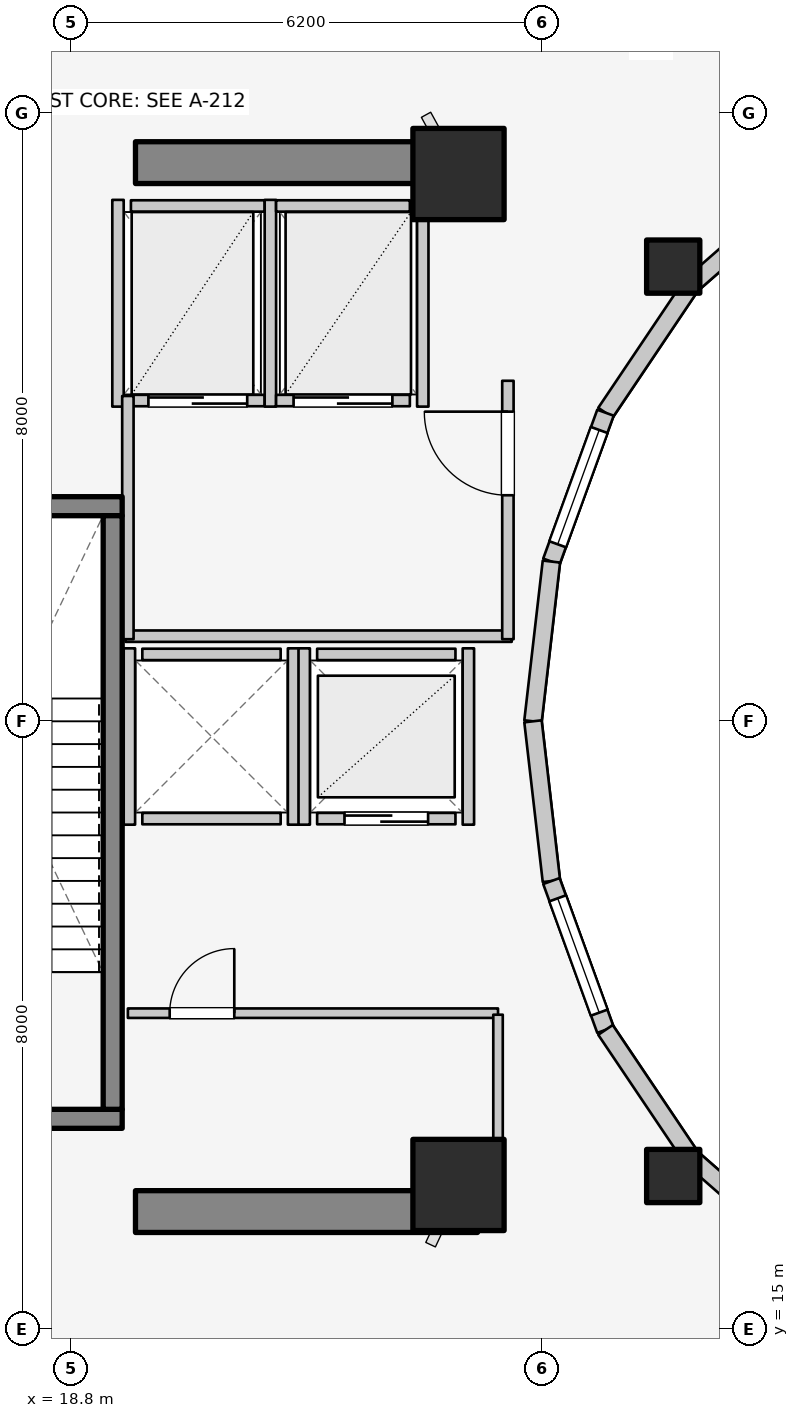
"""IFC4 building model, lengths in metres.
Left out: names, types, materials, properties, quantities, classifications, styles, units other than length and angle.
Written with IfcOpenShell. Run it as: python <this file> out.ifc"""

import sys

from ifc_helpers import new_model, si_unit, direction, frame, frame_2d, origin, origin_2d, place, context, subcontext, project, spatial, rectangle, extrude, element, fill, save


model = new_model("IFC4")
c1 = context("Model", 3, precision=1e-05, world=origin(), true_north=direction((0.0, 1.0)))
c2 = subcontext(c1, "Body", "Model", "MODEL_VIEW")
j1 = project(units=[si_unit("LENGTHUNIT", "METRE"), si_unit("PLANEANGLEUNIT", "RADIAN")], contexts=[c1])
p1 = place(None, origin())
s1 = spatial("IfcSite", under=j1, at=p1, CompositionType="ELEMENT")
p2 = place(p1, origin())
s2 = spatial("IfcBuilding", under=s1, at=p2, CompositionType="ELEMENT")
p3 = place(p2, frame((0.0, 0.0, 193.2)))
s3 = spatial("IfcBuildingStorey", under=s2, at=p3, CompositionType="ELEMENT", Elevation=193.2)
for number, where, z_axis, x_axis in (
    (1, (19.65, 16.55, 0.0), (0.0, 0.0, 1.0), (1.0, 0.0, 0.0)),
    (2, (19.65, 30.35, 0.0), (0.0, 0.0, 1.0), (1.0, 0.0, 0.0)),
):
    element("IfcWall", number, at=place(p3, frame(where, z_axis=z_axis, x_axis=x_axis)), inside=s3, PredefinedType="SHEAR", context=c2, shape_type="SweptSolid", body=[
        extrude(rectangle(XDim=4.5, YDim=0.55, at=frame_2d((2.25, 0.0))), origin(), (0.0, 0.0, 1.0), 4.2),
    ])
p4 = place(p3, frame((16.105, 17.77, 0.0), z_axis=(0.0, 0.0, 1.0), x_axis=(1.0, 0.0, 0.0)))
e3 = element("IfcWall", 3, at=p4, inside=s3, PredefinedType="SOLIDWALL", context=c2, shape_type="SweptSolid", body=[
    extrude(rectangle(XDim=3.37, YDim=0.25, at=frame_2d((1.685, 0.0))), origin(), (0.0, 0.0, 1.0), 4.2),
])
p5 = place(p4, frame((1.135, 0.0, 0.0)))
e4 = element("IfcOpeningElement", 4, at=p5, cuts=e3, PredefinedType="OPENING", context=c2, shape_type="SweptSolid", body=[
    extrude(rectangle(XDim=1.1, YDim=2.1, at=frame_2d((0.55, 1.05))), frame((0.0, 0.135, 0.0), z_axis=(0.0, -1.0, 0.0), x_axis=(1.0, 0.0, 0.0)), (0.0, 0.0, 1.0), 0.27),
])
p6 = place(p3, frame((16.105, 25.83, 0.0), z_axis=(0.0, 0.0, 1.0), x_axis=(1.0, 0.0, 0.0)))
e5 = element("IfcWall", 5, at=p6, inside=s3, PredefinedType="SOLIDWALL", context=c2, shape_type="SweptSolid", body=[
    extrude(rectangle(XDim=3.37, YDim=0.25, at=frame_2d((1.685, 0.0))), origin(), (0.0, 0.0, 1.0), 4.2),
])
p7 = place(p3, frame((19.35, 17.895, 0.0), z_axis=(0.0, 0.0, 1.0), x_axis=(0.0, 1.0, 0.0)))
e6 = element("IfcWall", 6, at=p7, inside=s3, PredefinedType="SOLIDWALL", context=c2, shape_type="SweptSolid", body=[
    extrude(rectangle(XDim=7.81, YDim=0.25, at=frame_2d((3.905, 0.0))), origin(), (0.0, 0.0, 1.0), 4.2),
])
for number, where, z_axis, x_axis in (
    (7, (23.9, 16.9, 0.0), (0.0, 0.0, 1.0), (1.0, 0.0, 0.0)),
    (8, (23.9, 30.2, 0.0), (0.0, 0.0, 1.0), (1.0, 0.0, 0.0)),
):
    element("IfcColumn", number, at=place(p3, frame(where, z_axis=z_axis, x_axis=x_axis)), inside=s3, PredefinedType="COLUMN", context=c2, shape_type="SweptSolid", body=[
        extrude(rectangle(XDim=1.2, YDim=1.2, at=origin_2d()), origin(), (0.0, 0.0, 1.0), 4.2),
    ])
for number, where, z_axis, x_axis in (
    (9, (26.725, 28.982, 0.0), (0.0, 0.0, 1.0), (1.0, 0.0, 0.0)),
    (10, (26.725, 17.018, 0.0), (0.0, 0.0, 1.0), (1.0, 0.0, 0.0)),
):
    element("IfcColumn", number, at=place(p3, frame(where, z_axis=z_axis, x_axis=x_axis)), inside=s3, PredefinedType="COLUMN", context=c2, shape_type="SweptSolid", body=[
        extrude(rectangle(XDim=0.7, YDim=0.7, at=origin_2d()), origin(), (0.0, 0.0, 1.0), 4.2),
    ])
p8 = place(p3, frame((28.44, 30.032, 0.0), z_axis=(0.0, 0.0, 1.0), x_axis=(-0.752576694707, -0.658504607869, 0.0)))
e11 = element("IfcWall", 11, at=p8, inside=s3, PredefinedType="STANDARD", context=c2, shape_type="SweptSolid", body=[
    extrude(rectangle(XDim=1.959, YDim=0.23, at=frame_2d((0.98, 0.0))), origin(), (0.0, 0.0, 1.0), 2.32),
])
p9 = place(p3, frame((26.965, 28.742, 0.0), z_axis=(0.0, 0.0, 1.0), x_axis=(-0.558197800898, -0.829707909492, 0.0)))
e12 = element("IfcWall", 12, at=p9, inside=s3, PredefinedType="STANDARD", context=c2, shape_type="SweptSolid", body=[
    extrude(rectangle(XDim=2.027, YDim=0.23, at=frame_2d((1.013, 0.0))), origin(), (0.0, 0.0, 1.0), 2.32),
])
p10 = place(p3, frame((25.834, 27.06, 0.0), z_axis=(0.0, 0.0, 1.0), x_axis=(-0.341423187295, -0.93990968033, 0.0)))
e13 = element("IfcWall", 13, at=p10, inside=s3, PredefinedType="STANDARD", context=c2, shape_type="SweptSolid", body=[
    extrude(rectangle(XDim=2.084, YDim=0.23, at=frame_2d((1.042, 0.0))), origin(), (0.0, 0.0, 1.0), 2.8),
])
p11 = place(p10, frame((0.242, 0.0, 0.85)))
e14 = element("IfcOpeningElement", 14, at=p11, cuts=e13, PredefinedType="OPENING", context=c2, shape_type="SweptSolid", body=[
    extrude(rectangle(XDim=1.6, YDim=1.65, at=frame_2d((0.8, 0.825))), frame((0.0, 0.125, 0.0), z_axis=(0.0, -1.0, 0.0), x_axis=(1.0, 0.0, 0.0)), (0.0, 0.0, 1.0), 0.25),
])
for number, where, z_axis, x_axis in (
    (15, (25.123, 25.102, 0.0), (0.0, 0.0, 1.0), (-0.115, -0.993, 0.0)),
    (16, (24.88, 23.0, 0.0), (0.0, 0.0, 1.0), (0.115, -0.993, 0.0)),
):
    element("IfcWall", number, at=place(p3, frame(where, z_axis=z_axis, x_axis=x_axis)), inside=s3, PredefinedType="STANDARD", context=c2, shape_type="SweptSolid", body=[
        extrude(rectangle(XDim=2.115, YDim=0.23, at=frame_2d((1.058, 0.0))), origin(), (0.0, 0.0, 1.0), 2.8),
    ])
p12 = place(p3, frame((25.123, 20.898, 0.0), z_axis=(0.0, 0.0, 1.0), x_axis=(0.341423187295, -0.93990968033, 0.0)))
e17 = element("IfcWall", 17, at=p12, inside=s3, PredefinedType="STANDARD", context=c2, shape_type="SweptSolid", body=[
    extrude(rectangle(XDim=2.084, YDim=0.23, at=frame_2d((1.042, 0.0))), origin(), (0.0, 0.0, 1.0), 2.8),
])
p13 = place(p12, frame((0.242, 0.0, 0.85)))
e18 = element("IfcOpeningElement", 18, at=p13, cuts=e17, PredefinedType="OPENING", context=c2, shape_type="SweptSolid", body=[
    extrude(rectangle(XDim=1.6, YDim=1.65, at=frame_2d((0.8, 0.825))), frame((0.0, 0.125, 0.0), z_axis=(0.0, -1.0, 0.0), x_axis=(1.0, 0.0, 0.0)), (0.0, 0.0, 1.0), 0.25),
])
p14 = place(p3, frame((25.834, 18.94, 0.0), z_axis=(0.0, 0.0, 1.0), x_axis=(0.558197800898, -0.829707909492, 0.0)))
e19 = element("IfcWall", 19, at=p14, inside=s3, PredefinedType="STANDARD", context=c2, shape_type="SweptSolid", body=[
    extrude(rectangle(XDim=2.027, YDim=0.23, at=frame_2d((1.013, 0.0))), origin(), (0.0, 0.0, 1.0), 2.32),
])
p15 = place(p3, frame((26.965, 17.258, 0.0), z_axis=(0.0, 0.0, 1.0), x_axis=(0.752576694707, -0.658504607869, 0.0)))
e20 = element("IfcWall", 20, at=p15, inside=s3, PredefinedType="STANDARD", context=c2, shape_type="SweptSolid", body=[
    extrude(rectangle(XDim=1.959, YDim=0.23, at=frame_2d((0.98, 0.0))), origin(), (0.0, 0.0, 1.0), 2.32),
])
for number, where, z_axis, x_axis in (
    (21, (19.74, 21.72, 0.0), (0.0, 0.0, 1.0), (1.0, 0.0, 0.0)),
    (22, (19.74, 23.88, 0.0), (0.0, 0.0, 1.0), (1.0, 0.0, 0.0)),
):
    element("IfcWall", number, at=place(p3, frame(where, z_axis=z_axis, x_axis=x_axis)), inside=s3, PredefinedType="SOLIDWALL", context=c2, shape_type="SweptSolid", body=[
        extrude(rectangle(XDim=1.82, YDim=0.15, at=frame_2d((0.91, 0.0))), origin(), (0.0, 0.0, 1.0), 3.675),
    ])
for number, where, z_axis, x_axis in (
    (23, (19.57, 21.64, 0.0), (0.0, 0.0, 1.0), (0.0, 1.0, 0.0)),
    (24, (21.73, 21.64, 0.0), (0.0, 0.0, 1.0), (0.0, 1.0, 0.0)),
):
    element("IfcWall", number, at=place(p3, frame(where, z_axis=z_axis, x_axis=x_axis)), inside=s3, PredefinedType="SOLIDWALL", context=c2, shape_type="SweptSolid", body=[
        extrude(rectangle(XDim=2.32, YDim=0.15, at=frame_2d((1.16, 0.0))), origin(), (0.0, 0.0, 1.0), 3.675),
    ])
p16 = place(p3, frame((22.04, 21.72, 0.0), z_axis=(0.0, 0.0, 1.0), x_axis=(1.0, 0.0, 0.0)))
e25 = element("IfcWall", 25, at=p16, inside=s3, PredefinedType="SOLIDWALL", context=c2, shape_type="SweptSolid", body=[
    extrude(rectangle(XDim=1.82, YDim=0.15, at=frame_2d((0.91, 0.0))), origin(), (0.0, 0.0, 1.0), 3.22),
])
p17 = place(p16, frame((0.36, 0.0, 0.0)))
e26 = element("IfcOpeningElement", 26, at=p17, cuts=e25, PredefinedType="OPENING", context=c2, shape_type="SweptSolid", body=[
    extrude(rectangle(XDim=1.1, YDim=2.1, at=frame_2d((0.55, 1.05))), frame((0.0, 0.085, 0.0), z_axis=(0.0, -1.0, 0.0), x_axis=(1.0, 0.0, 0.0)), (0.0, 0.0, 1.0), 0.17),
])
p18 = place(p3, frame((22.04, 23.88, 0.0), z_axis=(0.0, 0.0, 1.0), x_axis=(1.0, 0.0, 0.0)))
e27 = element("IfcWall", 27, at=p18, inside=s3, PredefinedType="SOLIDWALL", context=c2, shape_type="SweptSolid", body=[
    extrude(rectangle(XDim=1.82, YDim=0.15, at=frame_2d((0.91, 0.0))), origin(), (0.0, 0.0, 1.0), 3.22),
])
p19 = place(p3, frame((21.87, 21.64, 0.0), z_axis=(0.0, 0.0, 1.0), x_axis=(0.0, 1.0, 0.0)))
e28 = element("IfcWall", 28, at=p19, inside=s3, PredefinedType="SOLIDWALL", context=c2, shape_type="SweptSolid", body=[
    extrude(rectangle(XDim=2.32, YDim=0.15, at=frame_2d((1.16, 0.0))), origin(), (0.0, 0.0, 1.0), 3.675),
])
p20 = place(p3, frame((24.03, 21.64, 0.0), z_axis=(0.0, 0.0, 1.0), x_axis=(0.0, 1.0, 0.0)))
e29 = element("IfcWall", 29, at=p20, inside=s3, PredefinedType="SOLIDWALL", context=c2, shape_type="SweptSolid", body=[
    extrude(rectangle(XDim=2.32, YDim=0.15, at=frame_2d((1.16, 0.0))), origin(), (0.0, 0.0, 1.0), 3.22),
])
p21 = place(p3, frame((19.59, 27.22, 0.0), z_axis=(0.0, 0.0, 1.0), x_axis=(1.0, 0.0, 0.0)))
e30 = element("IfcWall", 30, at=p21, inside=s3, PredefinedType="SOLIDWALL", context=c2, shape_type="SweptSolid", body=[
    extrude(rectangle(XDim=1.76, YDim=0.15, at=frame_2d((0.88, 0.0))), origin(), (0.0, 0.0, 1.0), 3.675),
])
p22 = place(p21, frame((0.23, 0.0, 0.0)))
e31 = element("IfcOpeningElement", 31, at=p22, cuts=e30, PredefinedType="OPENING", context=c2, shape_type="SweptSolid", body=[
    extrude(rectangle(XDim=1.3, YDim=2.1, at=frame_2d((0.65, 1.05))), frame((0.0, 0.085, 0.0), z_axis=(0.0, -1.0, 0.0), x_axis=(1.0, 0.0, 0.0)), (0.0, 0.0, 1.0), 0.17),
])
p23 = place(p3, frame((19.59, 29.78, 0.0), z_axis=(0.0, 0.0, 1.0), x_axis=(1.0, 0.0, 0.0)))
e32 = element("IfcWall", 32, at=p23, inside=s3, PredefinedType="SOLIDWALL", context=c2, shape_type="SweptSolid", body=[
    extrude(rectangle(XDim=1.76, YDim=0.15, at=frame_2d((0.88, 0.0))), origin(), (0.0, 0.0, 1.0), 3.675),
])
for number, where, z_axis, x_axis in (
    (33, (19.42, 27.14, 0.0), (0.0, 0.0, 1.0), (0.0, 1.0, 0.0)),
    (34, (21.425, 27.14, 0.0), (0.0, 0.0, 1.0), (0.0, 1.0, 0.0)),
):
    element("IfcWall", number, at=place(p3, frame(where, z_axis=z_axis, x_axis=x_axis)), inside=s3, PredefinedType="SOLIDWALL", context=c2, shape_type="SweptSolid", body=[
        extrude(rectangle(XDim=2.72, YDim=0.15, at=frame_2d((1.36, 0.0))), origin(), (0.0, 0.0, 1.0), 3.675),
    ])
p24 = place(p3, frame((21.5, 27.22, 0.0), z_axis=(0.0, 0.0, 1.0), x_axis=(1.0, 0.0, 0.0)))
e35 = element("IfcWall", 35, at=p24, inside=s3, PredefinedType="SOLIDWALL", context=c2, shape_type="SweptSolid", body=[
    extrude(rectangle(XDim=1.76, YDim=0.15, at=frame_2d((0.88, 0.0))), origin(), (0.0, 0.0, 1.0), 3.675),
])
p25 = place(p24, frame((0.23, 0.0, 0.0)))
e36 = element("IfcOpeningElement", 36, at=p25, cuts=e35, PredefinedType="OPENING", context=c2, shape_type="SweptSolid", body=[
    extrude(rectangle(XDim=1.3, YDim=2.1, at=frame_2d((0.65, 1.05))), frame((0.0, 0.085, 0.0), z_axis=(0.0, -1.0, 0.0), x_axis=(1.0, 0.0, 0.0)), (0.0, 0.0, 1.0), 0.17),
])
p26 = place(p3, frame((21.5, 29.78, 0.0), z_axis=(0.0, 0.0, 1.0), x_axis=(1.0, 0.0, 0.0)))
e37 = element("IfcWall", 37, at=p26, inside=s3, PredefinedType="SOLIDWALL", context=c2, shape_type="SweptSolid", body=[
    extrude(rectangle(XDim=1.76, YDim=0.15, at=frame_2d((0.88, 0.0))), origin(), (0.0, 0.0, 1.0), 3.675),
])
p27 = place(p3, frame((23.43, 27.14, 0.0), z_axis=(0.0, 0.0, 1.0), x_axis=(0.0, 1.0, 0.0)))
e38 = element("IfcWall", 38, at=p27, inside=s3, PredefinedType="SOLIDWALL", context=c2, shape_type="SweptSolid", body=[
    extrude(rectangle(XDim=2.72, YDim=0.15, at=frame_2d((1.36, 0.0))), origin(), (0.0, 0.0, 1.0), 3.675),
])
p28 = place(p3, frame((19.52, 24.12, 0.0), z_axis=(0.0, 0.0, 1.0), x_axis=(1.0, 0.0, 0.0)))
e39 = element("IfcWall", 39, at=p28, inside=s3, PredefinedType="PARTITIONING", context=c2, shape_type="SweptSolid", body=[
    extrude(rectangle(XDim=5.08, YDim=0.15, at=frame_2d((2.54, 0.0))), origin(), (0.0, 0.0, 1.0), 3.22),
])
p29 = place(p3, frame((19.55, 24.08, 0.0), z_axis=(0.0, 0.0, 1.0), x_axis=(0.0, 1.0, 0.0)))
e40 = element("IfcWall", 40, at=p29, inside=s3, PredefinedType="PARTITIONING", context=c2, shape_type="SweptSolid", body=[
    extrude(rectangle(XDim=3.2, YDim=0.15, at=frame_2d((1.6, 0.0))), origin(), (0.0, 0.0, 1.0), 3.675),
])
p30 = place(p3, frame((24.55, 24.08, 0.0), z_axis=(0.0, 0.0, 1.0), x_axis=(0.0, 1.0, 0.0)))
e41 = element("IfcWall", 41, at=p30, inside=s3, PredefinedType="PARTITIONING", context=c2, shape_type="SweptSolid", body=[
    extrude(rectangle(XDim=3.4, YDim=0.15, at=frame_2d((1.7, 0.0))), origin(), (0.0, 0.0, 1.0), 3.675),
])
p31 = place(p30, frame((1.894, 0.0, 0.0)))
e42 = element("IfcOpeningElement", 42, at=p31, cuts=e41, PredefinedType="OPENING", context=c2, shape_type="SweptSolid", body=[
    extrude(rectangle(XDim=1.1, YDim=2.1, at=frame_2d((0.55, 1.05))), frame((0.0, 0.085, 0.0), z_axis=(0.0, -1.0, 0.0), x_axis=(1.0, 0.0, 0.0)), (0.0, 0.0, 1.0), 0.17),
])
p32 = place(p3, frame((19.55, 19.16, 0.0), z_axis=(0.0, 0.0, 1.0), x_axis=(1.0, 0.0, 0.0)))
e43 = element("IfcWall", 43, at=p32, inside=s3, PredefinedType="PARTITIONING", context=c2, shape_type="SweptSolid", body=[
    extrude(rectangle(XDim=4.87, YDim=0.125, at=frame_2d((2.435, 0.0))), origin(), (0.0, 0.0, 1.0), 3.22),
])
p33 = place(p32, frame((0.55, 0.0, 0.0)))
e44 = element("IfcOpeningElement", 44, at=p33, cuts=e43, PredefinedType="OPENING", context=c2, shape_type="SweptSolid", body=[
    extrude(rectangle(XDim=0.85, YDim=2.05, at=frame_2d((0.425, 1.025))), frame((0.0, 0.073, 0.0), z_axis=(0.0, -1.0, 0.0), x_axis=(1.0, 0.0, 0.0)), (0.0, 0.0, 1.0), 0.145),
])
p34 = place(p3, frame((24.42, 17.1, 0.0), z_axis=(0.0, 0.0, 1.0), x_axis=(0.0, 1.0, 0.0)))
e45 = element("IfcWall", 45, at=p34, inside=s3, PredefinedType="PARTITIONING", context=c2, shape_type="SweptSolid", body=[
    extrude(rectangle(XDim=2.04, YDim=0.125, at=frame_2d((1.02, 0.0))), origin(), (0.0, 0.0, 1.0), 3.052),
])
p35 = place(p11, origin())
e46 = element("IfcWindow", 46, at=p35, inside=s3, PartitioningType="SINGLE_PANEL", PredefinedType="WINDOW", context=c2, shape_type="SweptSolid", body=[
    extrude(rectangle(XDim=1.6, YDim=1.65, at=frame_2d((0.8, 0.825))), frame((0.0, 0.03, 0.0), z_axis=(0.0, -1.0, 0.0), x_axis=(1.0, 0.0, 0.0)), (0.0, 0.0, 1.0), 0.06),
])
fill(e14, e46)
p36 = place(p13, origin())
e47 = element("IfcWindow", 47, at=p36, inside=s3, PartitioningType="SINGLE_PANEL", PredefinedType="WINDOW", context=c2, shape_type="SweptSolid", body=[
    extrude(rectangle(XDim=1.6, YDim=1.65, at=frame_2d((0.8, 0.825))), frame((0.0, 0.03, 0.0), z_axis=(0.0, -1.0, 0.0), x_axis=(1.0, 0.0, 0.0)), (0.0, 0.0, 1.0), 0.06),
])
fill(e18, e47)
p37 = place(p17, origin())
e48 = element("IfcDoor", 48, at=p37, inside=s3, OperationType="DOUBLE_DOOR_SLIDING", PredefinedType="DOOR", context=c2, shape_type="SweptSolid", body=[
    extrude(rectangle(XDim=1.1, YDim=2.1, at=frame_2d((0.55, 1.05))), frame((0.0, 0.025, 0.0), z_axis=(0.0, -1.0, 0.0), x_axis=(1.0, 0.0, 0.0)), (0.0, 0.0, 1.0), 0.05),
])
fill(e26, e48)
p38 = place(p22, origin())
e49 = element("IfcDoor", 49, at=p38, inside=s3, OperationType="DOUBLE_DOOR_SLIDING", PredefinedType="DOOR", context=c2, shape_type="SweptSolid", body=[
    extrude(rectangle(XDim=1.3, YDim=2.1, at=frame_2d((0.65, 1.05))), frame((0.0, 0.025, 0.0), z_axis=(0.0, -1.0, 0.0), x_axis=(1.0, 0.0, 0.0)), (0.0, 0.0, 1.0), 0.05),
])
fill(e31, e49)
p39 = place(p25, origin())
e50 = element("IfcDoor", 50, at=p39, inside=s3, OperationType="DOUBLE_DOOR_SLIDING", PredefinedType="DOOR", context=c2, shape_type="SweptSolid", body=[
    extrude(rectangle(XDim=1.3, YDim=2.1, at=frame_2d((0.65, 1.05))), frame((0.0, 0.025, 0.0), z_axis=(0.0, -1.0, 0.0), x_axis=(1.0, 0.0, 0.0)), (0.0, 0.0, 1.0), 0.05),
])
fill(e36, e50)
p40 = place(p31, origin())
e51 = element("IfcDoor", 51, at=p40, inside=s3, OperationType="SINGLE_SWING_RIGHT", PredefinedType="DOOR", context=c2, shape_type="SweptSolid", body=[
    extrude(rectangle(XDim=1.1, YDim=2.1, at=frame_2d((0.55, 1.05))), frame((0.0, 0.025, 0.0), z_axis=(0.0, -1.0, 0.0), x_axis=(1.0, 0.0, 0.0)), (0.0, 0.0, 1.0), 0.05),
])
fill(e42, e51)
p41 = place(p33, origin())
e52 = element("IfcDoor", 52, at=p41, inside=s3, OperationType="SINGLE_SWING_RIGHT", PredefinedType="DOOR", context=c2, shape_type="SweptSolid", body=[
    extrude(rectangle(XDim=0.85, YDim=2.05, at=frame_2d((0.425, 1.025))), frame((0.0, 0.025, 0.0), z_axis=(0.0, -1.0, 0.0), x_axis=(1.0, 0.0, 0.0)), (0.0, 0.0, 1.0), 0.05),
])
fill(e44, e52)
save(model, sys.argv[1])
